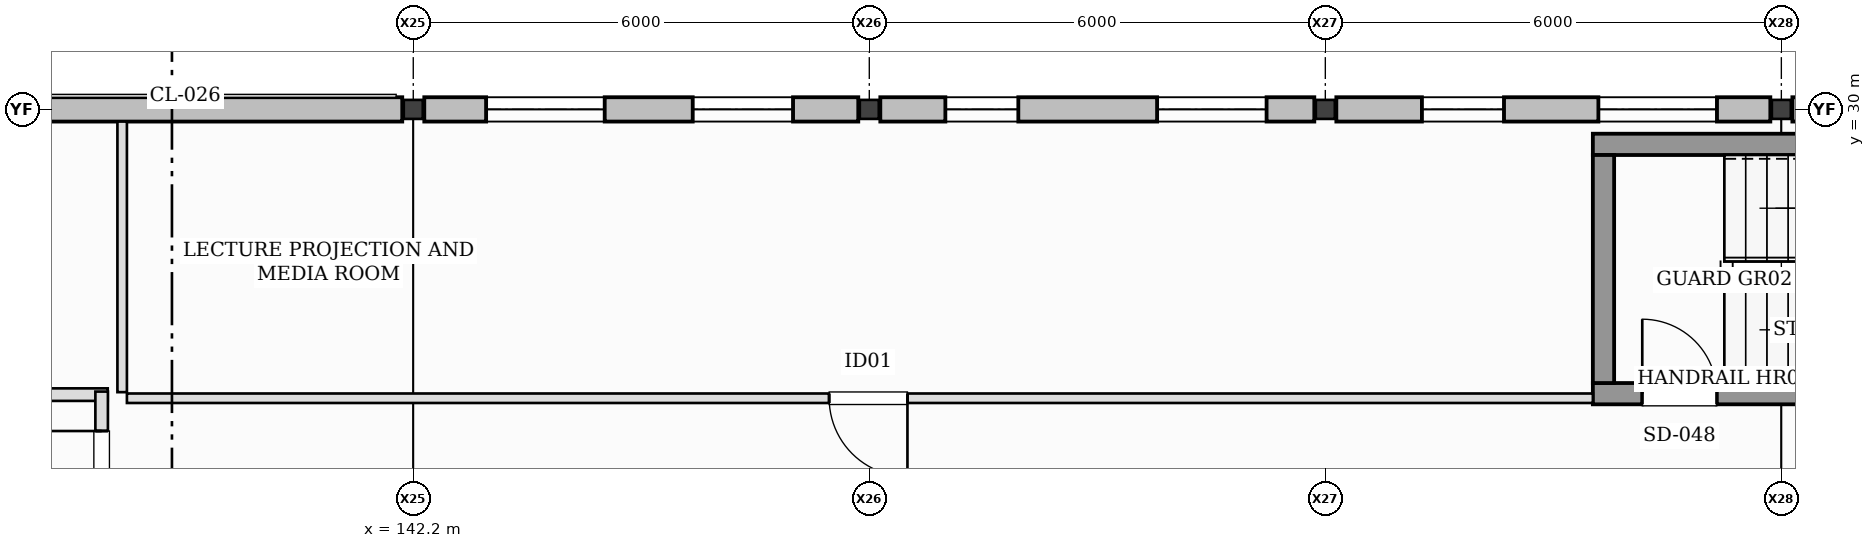
"""IFC4 building model, lengths in metres.
Left out: names, types, materials, properties, quantities, classifications, styles, units other than length and angle.
Written with IfcOpenShell. Run it as: python <this file> out.ifc"""

import sys

from ifc_helpers import new_model, si_unit, direction, frame, frame_2d, origin, origin_2d, place, context, subcontext, project, spatial, rectangle, hollow_rectangle, extrude, element, fill, save


model = new_model("IFC4")
c1 = context("Model", 3, precision=1e-05, world=origin(), true_north=direction((0.0, 1.0)))
c2 = subcontext(c1, "Body", "Model", "MODEL_VIEW")
j1 = project(units=[si_unit("LENGTHUNIT", "METRE"), si_unit("PLANEANGLEUNIT", "RADIAN")], contexts=[c1])
p1 = place(None, origin())
s1 = spatial("IfcSite", under=j1, at=p1, CompositionType="ELEMENT")
p2 = place(p1, origin())
s2 = spatial("IfcBuilding", under=s1, at=p2, CompositionType="ELEMENT")
p3 = place(p2, frame((0.0, 0.0, 6.0)))
s3 = spatial("IfcBuildingStorey", under=s2, at=p3, CompositionType="ELEMENT", Elevation=6.0)
for number, where, z_axis, x_axis in (
    (1, (142.2, 30.0, 0.0), (0.0, 0.0, 1.0), (1.0, 0.0, 0.0)),
    (2, (148.2, 30.0, 0.0), (0.0, 0.0, 1.0), (1.0, 0.0, 0.0)),
    (3, (154.2, 30.0, 0.0), (0.0, 0.0, 1.0), (1.0, 0.0, 0.0)),
    (4, (160.2, 30.0, 0.0), (0.0, 0.0, 1.0), (1.0, 0.0, 0.0)),
):
    element("IfcColumn", number, at=place(p3, frame(where, z_axis=z_axis, x_axis=x_axis)), inside=s3, PredefinedType="COLUMN", context=c2, shape_type="SweptSolid", body=[
        extrude(hollow_rectangle(XDim=0.25, YDim=0.25, WallThickness=0.012, at=origin_2d()), origin(), (0.0, 0.0, 1.0), 4.0),
    ])
p4 = place(p3, frame((142.055, 30.0, 0.0), z_axis=(0.0, 0.0, 1.0), x_axis=(-1.0, 0.0, 0.0)))
e5 = element("IfcWall", 5, at=p4, inside=s3, PredefinedType="STANDARD", context=c2, shape_type="SweptSolid", body=[
    extrude(rectangle(XDim=5.71, YDim=0.32, at=frame_2d((2.855, 0.0))), origin(), (0.0, 0.0, 1.0), 3.153),
])
p5 = place(p3, frame((148.055, 30.0, 0.0), z_axis=(0.0, 0.0, 1.0), x_axis=(-1.0, 0.0, 0.0)))
e6 = element("IfcWall", 6, at=p5, inside=s3, PredefinedType="STANDARD", context=c2, shape_type="SweptSolid", body=[
    extrude(rectangle(XDim=5.71, YDim=0.32, at=frame_2d((2.855, 0.0))), origin(), (0.0, 0.0, 1.0), 3.153),
])
p6 = place(p5, frame((0.858, 0.0, 0.86)))
e7 = element("IfcOpeningElement", 7, at=p6, cuts=e6, PredefinedType="OPENING", context=c2, shape_type="SweptSolid", body=[
    extrude(rectangle(XDim=1.32, YDim=1.32, at=frame_2d((0.66, 0.66))), frame((0.0, 0.17, 0.0), z_axis=(0.0, -1.0, 0.0), x_axis=(1.0, 0.0, 0.0)), (0.0, 0.0, 1.0), 0.34),
])
p7 = place(p5, frame((3.336, 0.0, 0.82)))
e8 = element("IfcOpeningElement", 8, at=p7, cuts=e6, PredefinedType="OPENING", context=c2, shape_type="SweptSolid", body=[
    extrude(rectangle(XDim=1.56, YDim=1.56, at=frame_2d((0.78, 0.78))), frame((0.0, 0.17, 0.0), z_axis=(0.0, -1.0, 0.0), x_axis=(1.0, 0.0, 0.0)), (0.0, 0.0, 1.0), 0.34),
])
p8 = place(p3, frame((154.055, 30.0, 0.0), z_axis=(0.0, 0.0, 1.0), x_axis=(-1.0, 0.0, 0.0)))
e9 = element("IfcWall", 9, at=p8, inside=s3, PredefinedType="STANDARD", context=c2, shape_type="SweptSolid", body=[
    extrude(rectangle(XDim=5.71, YDim=0.32, at=frame_2d((2.855, 0.0))), origin(), (0.0, 0.0, 1.0), 3.153),
])
p9 = place(p8, frame((0.628, 0.0, 1.18)))
e10 = element("IfcOpeningElement", 10, at=p9, cuts=e9, PredefinedType="OPENING", context=c2, shape_type="SweptSolid", body=[
    extrude(rectangle(XDim=1.44, YDim=1.44, at=frame_2d((0.72, 0.72))), frame((0.0, 0.17, 0.0), z_axis=(0.0, -1.0, 0.0), x_axis=(1.0, 0.0, 0.0)), (0.0, 0.0, 1.0), 0.34),
])
p10 = place(p8, frame((3.894, 0.0, 0.96)))
e11 = element("IfcOpeningElement", 11, at=p10, cuts=e9, PredefinedType="OPENING", context=c2, shape_type="SweptSolid", body=[
    extrude(rectangle(XDim=0.96, YDim=0.96, at=frame_2d((0.48, 0.48))), frame((0.0, 0.17, 0.0), z_axis=(0.0, -1.0, 0.0), x_axis=(1.0, 0.0, 0.0)), (0.0, 0.0, 1.0), 0.34),
])
p11 = place(p3, frame((160.055, 30.0, 0.0), z_axis=(0.0, 0.0, 1.0), x_axis=(-1.0, 0.0, 0.0)))
e12 = element("IfcWall", 12, at=p11, inside=s3, PredefinedType="STANDARD", context=c2, shape_type="SweptSolid", body=[
    extrude(rectangle(XDim=5.71, YDim=0.32, at=frame_2d((2.855, 0.0))), origin(), (0.0, 0.0, 1.0), 3.153),
])
p12 = place(p11, frame((0.702, 0.0, 0.82)))
e13 = element("IfcOpeningElement", 13, at=p12, cuts=e12, PredefinedType="OPENING", context=c2, shape_type="SweptSolid", body=[
    extrude(rectangle(XDim=1.56, YDim=1.56, at=frame_2d((0.78, 0.78))), frame((0.0, 0.17, 0.0), z_axis=(0.0, -1.0, 0.0), x_axis=(1.0, 0.0, 0.0)), (0.0, 0.0, 1.0), 0.34),
])
p13 = place(p11, frame((3.504, 0.0, 1.28)))
e14 = element("IfcOpeningElement", 14, at=p13, cuts=e12, PredefinedType="OPENING", context=c2, shape_type="SweptSolid", body=[
    extrude(rectangle(XDim=1.08, YDim=1.08, at=frame_2d((0.54, 0.54))), frame((0.0, 0.17, 0.0), z_axis=(0.0, -1.0, 0.0), x_axis=(1.0, 0.0, 0.0)), (0.0, 0.0, 1.0), 0.34),
])
p14 = place(p3, frame((166.055, 30.0, 0.0), z_axis=(0.0, 0.0, 1.0), x_axis=(-1.0, 0.0, 0.0)))
e15 = element("IfcWall", 15, at=p14, inside=s3, PredefinedType="STANDARD", context=c2, shape_type="SweptSolid", body=[
    extrude(rectangle(XDim=5.71, YDim=0.32, at=frame_2d((2.855, 0.0))), origin(), (0.0, 0.0, 1.0), 3.153),
])
p15 = place(p14, frame((0.796, 0.0, 0.96)))
e16 = element("IfcOpeningElement", 16, at=p15, cuts=e15, PredefinedType="OPENING", context=c2, shape_type="SweptSolid", body=[
    extrude(rectangle(XDim=0.96, YDim=0.96, at=frame_2d((0.48, 0.48))), frame((0.0, 0.17, 0.0), z_axis=(0.0, -1.0, 0.0), x_axis=(1.0, 0.0, 0.0)), (0.0, 0.0, 1.0), 0.34),
])
p16 = place(p14, frame((3.738, 0.0, 0.86)))
e17 = element("IfcOpeningElement", 17, at=p16, cuts=e15, PredefinedType="OPENING", context=c2, shape_type="SweptSolid", body=[
    extrude(rectangle(XDim=1.2, YDim=1.2, at=frame_2d((0.6, 0.6))), frame((0.0, 0.17, 0.0), z_axis=(0.0, -1.0, 0.0), x_axis=(1.0, 0.0, 0.0)), (0.0, 0.0, 1.0), 0.34),
])
p17 = place(p3, frame((157.72, 26.26, 0.0), z_axis=(0.0, 0.0, 1.0), x_axis=(1.0, 0.0, 0.0)))
e18 = element("IfcWall", 18, at=p17, inside=s3, PredefinedType="SHEAR", context=c2, shape_type="SweptSolid", body=[
    extrude(rectangle(XDim=8.16, YDim=0.28, at=frame_2d((4.08, 0.0))), origin(), (0.0, 0.0, 1.0), 4.0),
])
p18 = place(p17, frame((0.65, 0.0, 0.0)))
e19 = element("IfcOpeningElement", 19, at=p18, cuts=e18, PredefinedType="OPENING", context=c2, shape_type="SweptSolid", body=[
    extrude(rectangle(XDim=0.98, YDim=2.15, at=frame_2d((0.49, 1.075))), frame((0.0, 0.15, 0.0), z_axis=(0.0, -1.0, 0.0), x_axis=(1.0, 0.0, 0.0)), (0.0, 0.0, 1.0), 0.3),
])
p19 = place(p3, frame((165.88, 29.54, 0.0), z_axis=(0.0, 0.0, 1.0), x_axis=(-1.0, 0.0, 0.0)))
e20 = element("IfcWall", 20, at=p19, inside=s3, PredefinedType="SHEAR", context=c2, shape_type="SweptSolid", body=[
    extrude(rectangle(XDim=8.16, YDim=0.28, at=frame_2d((4.08, 0.0))), origin(), (0.0, 0.0, 1.0), 4.0),
])
p20 = place(p3, frame((157.86, 29.4, 0.0), z_axis=(0.0, 0.0, 1.0), x_axis=(0.0, -1.0, 0.0)))
e21 = element("IfcWall", 21, at=p20, inside=s3, PredefinedType="SHEAR", context=c2, shape_type="SweptSolid", body=[
    extrude(rectangle(XDim=3.0, YDim=0.28, at=frame_2d((1.5, 0.0))), origin(), (0.0, 0.0, 1.0), 4.0),
])
p21 = place(p3, frame((137.065, 26.248, 0.0), z_axis=(0.0, 0.0, 1.0), x_axis=(1.0, 0.0, 0.0)))
e22 = element("IfcWall", 22, at=p21, inside=s3, PredefinedType="PARTITIONING", context=c2, shape_type="SweptSolid", body=[
    extrude(rectangle(XDim=1.115, YDim=0.165, at=frame_2d((0.558, 0.0))), origin(), (0.0, 0.0, 1.0), 3.72),
])
p22 = place(p3, frame((138.1, 24.17, 0.0), z_axis=(0.0, 0.0, 1.0), x_axis=(0.0, 1.0, 0.0)))
e23 = element("IfcWall", 23, at=p22, inside=s3, PredefinedType="PARTITIONING", context=c2, shape_type="SweptSolid", body=[
    extrude(rectangle(XDim=2.118, YDim=0.165, at=frame_2d((1.059, 0.0))), origin(), (0.0, 0.0, 1.0), 3.379),
])
p23 = place(p22, frame((0.519, 0.0, 0.0)))
e24 = element("IfcOpeningElement", 24, at=p23, cuts=e23, PredefinedType="OPENING", context=c2, shape_type="SweptSolid", body=[
    extrude(rectangle(XDim=1.08, YDim=2.14, at=frame_2d((0.54, 1.07))), frame((0.0, 0.093, 0.0), z_axis=(0.0, -1.0, 0.0), x_axis=(1.0, 0.0, 0.0)), (0.0, 0.0, 1.0), 0.185),
])
p24 = place(p3, frame((138.37, 26.28, 0.0), z_axis=(0.0, 0.0, 1.0), x_axis=(0.0, 1.0, 0.0)))
e25 = element("IfcWall", 25, at=p24, inside=s3, PredefinedType="PARTITIONING", context=c2, shape_type="SweptSolid", body=[
    extrude(rectangle(XDim=3.56, YDim=0.125, at=frame_2d((1.78, 0.0))), origin(), (0.0, 0.0, 1.0), 3.379),
])
p25 = place(p3, frame((157.72, 26.2, 0.0), z_axis=(0.0, 0.0, 1.0), x_axis=(-1.0, 0.0, 0.0)))
e26 = element("IfcWall", 26, at=p25, inside=s3, PredefinedType="PARTITIONING", context=c2, shape_type="SweptSolid", body=[
    extrude(rectangle(XDim=19.287, YDim=0.125, at=frame_2d((9.644, 0.0))), origin(), (0.0, 0.0, 1.0), 3.72),
])
p26 = place(p25, frame((9.018, 0.0, 0.0)))
e27 = element("IfcOpeningElement", 27, at=p26, cuts=e26, PredefinedType="OPENING", context=c2, shape_type="SweptSolid", body=[
    extrude(rectangle(XDim=1.03, YDim=2.15, at=frame_2d((0.515, 1.075))), frame((0.0, 0.073, 0.0), z_axis=(0.0, -1.0, 0.0), x_axis=(1.0, 0.0, 0.0)), (0.0, 0.0, 1.0), 0.145),
])
p27 = place(p6, origin())
e28 = element("IfcWindow", 28, at=p27, inside=s3, PartitioningType="SINGLE_PANEL", PredefinedType="WINDOW", context=c2, shape_type="SweptSolid", body=[
    extrude(rectangle(XDim=1.32, YDim=1.32, at=frame_2d((0.66, 0.66))), frame((0.0, 0.03, 0.0), z_axis=(0.0, -1.0, 0.0), x_axis=(1.0, 0.0, 0.0)), (0.0, 0.0, 1.0), 0.06),
])
fill(e7, e28)
p28 = place(p7, origin())
e29 = element("IfcWindow", 29, at=p28, inside=s3, PartitioningType="SINGLE_PANEL", PredefinedType="WINDOW", context=c2, shape_type="SweptSolid", body=[
    extrude(rectangle(XDim=1.56, YDim=1.56, at=frame_2d((0.78, 0.78))), frame((0.0, 0.03, 0.0), z_axis=(0.0, -1.0, 0.0), x_axis=(1.0, 0.0, 0.0)), (0.0, 0.0, 1.0), 0.06),
])
fill(e8, e29)
p29 = place(p9, origin())
e30 = element("IfcWindow", 30, at=p29, inside=s3, PartitioningType="SINGLE_PANEL", PredefinedType="WINDOW", context=c2, shape_type="SweptSolid", body=[
    extrude(rectangle(XDim=1.44, YDim=1.44, at=frame_2d((0.72, 0.72))), frame((0.0, 0.03, 0.0), z_axis=(0.0, -1.0, 0.0), x_axis=(1.0, 0.0, 0.0)), (0.0, 0.0, 1.0), 0.06),
])
fill(e10, e30)
p30 = place(p10, origin())
e31 = element("IfcWindow", 31, at=p30, inside=s3, PartitioningType="SINGLE_PANEL", PredefinedType="WINDOW", context=c2, shape_type="SweptSolid", body=[
    extrude(rectangle(XDim=0.96, YDim=0.96, at=frame_2d((0.48, 0.48))), frame((0.0, 0.03, 0.0), z_axis=(0.0, -1.0, 0.0), x_axis=(1.0, 0.0, 0.0)), (0.0, 0.0, 1.0), 0.06),
])
fill(e11, e31)
p31 = place(p12, origin())
e32 = element("IfcWindow", 32, at=p31, inside=s3, PartitioningType="SINGLE_PANEL", PredefinedType="WINDOW", context=c2, shape_type="SweptSolid", body=[
    extrude(rectangle(XDim=1.56, YDim=1.56, at=frame_2d((0.78, 0.78))), frame((0.0, 0.03, 0.0), z_axis=(0.0, -1.0, 0.0), x_axis=(1.0, 0.0, 0.0)), (0.0, 0.0, 1.0), 0.06),
])
fill(e13, e32)
p32 = place(p13, origin())
e33 = element("IfcWindow", 33, at=p32, inside=s3, PartitioningType="SINGLE_PANEL", PredefinedType="WINDOW", context=c2, shape_type="SweptSolid", body=[
    extrude(rectangle(XDim=1.08, YDim=1.08, at=frame_2d((0.54, 0.54))), frame((0.0, 0.03, 0.0), z_axis=(0.0, -1.0, 0.0), x_axis=(1.0, 0.0, 0.0)), (0.0, 0.0, 1.0), 0.06),
])
fill(e14, e33)
p33 = place(p18, origin())
e34 = element("IfcDoor", 34, at=p33, inside=s3, OperationType="SINGLE_SWING_LEFT", PredefinedType="DOOR", context=c2, shape_type="SweptSolid", body=[
    extrude(rectangle(XDim=0.98, YDim=2.15, at=frame_2d((0.49, 1.075))), frame((0.0, 0.025, 0.0), z_axis=(0.0, -1.0, 0.0), x_axis=(1.0, 0.0, 0.0)), (0.0, 0.0, 1.0), 0.05),
])
fill(e19, e34)
p34 = place(p23, origin())
e35 = element("IfcDoor", 35, at=p34, inside=s3, OperationType="SINGLE_SWING_RIGHT", PredefinedType="DOOR", context=c2, shape_type="SweptSolid", body=[
    extrude(rectangle(XDim=1.08, YDim=2.14, at=frame_2d((0.54, 1.07))), frame((0.0, 0.025, 0.0), z_axis=(0.0, -1.0, 0.0), x_axis=(1.0, 0.0, 0.0)), (0.0, 0.0, 1.0), 0.05),
])
fill(e24, e35)
p35 = place(p26, frame((1.03, 0.0, 0.0), z_axis=(0.0, 0.0, 1.0), x_axis=(-1.0, 0.0, 0.0)))
e36 = element("IfcDoor", 36, at=p35, inside=s3, OperationType="SINGLE_SWING_LEFT", PredefinedType="DOOR", context=c2, shape_type="SweptSolid", body=[
    extrude(rectangle(XDim=1.03, YDim=2.15, at=frame_2d((0.515, 1.075))), frame((0.0, 0.025, 0.0), z_axis=(0.0, -1.0, 0.0), x_axis=(1.0, 0.0, 0.0)), (0.0, 0.0, 1.0), 0.05),
])
fill(e27, e36)
save(model, sys.argv[1])
